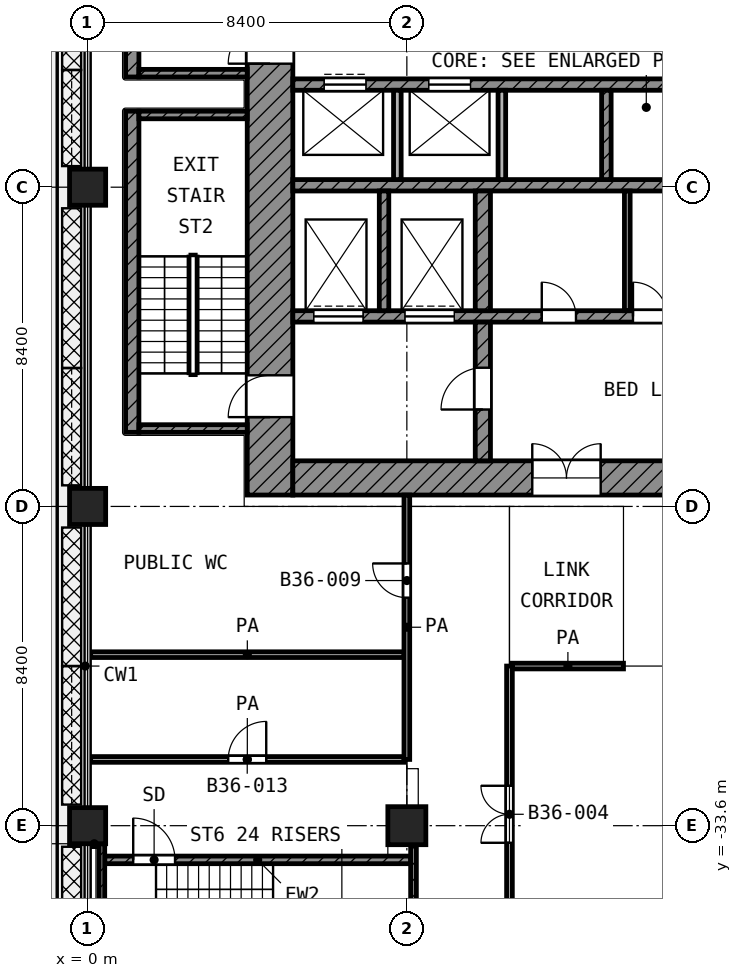
"""IFC4 building model, lengths in metres.
Left out: names, types, materials, properties, quantities, classifications, styles, units other than length and angle.
Written with IfcOpenShell. Run it as: python <this file> out.ifc"""

import sys

from ifc_helpers import new_model, si_unit, direction, frame, frame_2d, origin, origin_2d, place, context, subcontext, project, spatial, rectangle, extrude, element, fill, save


model = new_model("IFC4")
c1 = context("Model", 3, precision=1e-05, world=origin(), true_north=direction((0.0, 1.0)))
c2 = subcontext(c1, "Body", "Model", "MODEL_VIEW")
j1 = project(units=[si_unit("LENGTHUNIT", "METRE"), si_unit("PLANEANGLEUNIT", "RADIAN")], contexts=[c1])
p1 = place(None, origin())
s1 = spatial("IfcSite", under=j1, at=p1, CompositionType="ELEMENT")
p2 = place(p1, origin())
s2 = spatial("IfcBuilding", under=s1, at=p2, CompositionType="ELEMENT")
p3 = place(p2, frame((0.0, 0.0, 158.4)))
s3 = spatial("IfcBuildingStorey", under=s2, at=p3, CompositionType="ELEMENT", Elevation=158.4)
for number, where, z_axis, x_axis in (
    (1, (0.0, -16.8, 0.0), (0.0, 0.0, 1.0), (1.0, 0.0, 0.0)),
    (2, (0.0, -25.2, 0.0), (0.0, 0.0, 1.0), (1.0, 0.0, 0.0)),
    (3, (0.0, -33.6, 0.0), (0.0, 0.0, 1.0), (1.0, 0.0, 0.0)),
):
    element("IfcColumn", number, at=place(p3, frame(where, z_axis=z_axis, x_axis=x_axis)), inside=s3, PredefinedType="COLUMN", context=c2, shape_type="SweptSolid", body=[
        extrude(rectangle(XDim=0.95, YDim=0.95, at=origin_2d()), origin(), (0.0, 0.0, 1.0), 4.2),
    ])
p4 = place(p3, frame((8.4, -33.6, 0.0), z_axis=(0.0, 0.0, 1.0), x_axis=(1.0, 0.0, 0.0)))
e4 = element("IfcColumn", 4, at=p4, inside=s3, PredefinedType="COLUMN", context=c2, shape_type="SweptSolid", body=[
    extrude(rectangle(XDim=1.0, YDim=1.0, at=origin_2d()), origin(), (0.0, 0.0, 1.0), 4.2),
])
p5 = place(p3, frame((4.8, -24.9, 0.0), z_axis=(0.0, 0.0, 1.0), x_axis=(0.0, 1.0, 0.0)))
e5 = element("IfcWall", 5, at=p5, inside=s3, PredefinedType="SHEAR", context=c2, shape_type="SweptSolid", body=[
    extrude(rectangle(XDim=19.5, YDim=1.2, at=frame_2d((9.75, 0.0))), origin(), (0.0, 0.0, 1.0), 3.6),
])
p6 = place(p5, frame((11.35, 0.0, 0.0)))
e6 = element("IfcOpeningElement", 6, at=p6, cuts=e5, PredefinedType="OPENING", context=c2, shape_type="SweptSolid", body=[
    extrude(rectangle(XDim=1.1, YDim=2.1, at=frame_2d((0.55, 1.05))), frame((0.0, 0.61, 0.0), z_axis=(0.0, -1.0, 0.0), x_axis=(1.0, 0.0, 0.0)), (0.0, 0.0, 1.0), 1.22),
])
p7 = place(p5, frame((2.05, 0.0, 0.0)))
e7 = element("IfcOpeningElement", 7, at=p7, cuts=e5, PredefinedType="OPENING", context=c2, shape_type="SweptSolid", body=[
    extrude(rectangle(XDim=1.1, YDim=2.1, at=frame_2d((0.55, 1.05))), frame((0.0, 0.61, 0.0), z_axis=(0.0, -1.0, 0.0), x_axis=(1.0, 0.0, 0.0)), (0.0, 0.0, 1.0), 1.22),
])
p8 = place(p3, frame((5.4, -24.45, 0.0), z_axis=(0.0, 0.0, 1.0), x_axis=(1.0, 0.0, 0.0)))
e8 = element("IfcWall", 8, at=p8, inside=s3, PredefinedType="SHEAR", context=c2, shape_type="SweptSolid", body=[
    extrude(rectangle(XDim=18.6, YDim=0.9, at=frame_2d((9.3, 0.0))), origin(), (0.0, 0.0, 1.0), 3.6),
])
p9 = place(p8, frame((6.3, 0.0, 0.0)))
e9 = element("IfcOpeningElement", 9, at=p9, cuts=e8, PredefinedType="OPENING", context=c2, shape_type="SweptSolid", body=[
    extrude(rectangle(XDim=1.8, YDim=2.1, at=frame_2d((0.9, 1.05))), frame((0.0, 0.46, 0.0), z_axis=(0.0, -1.0, 0.0), x_axis=(1.0, 0.0, 0.0)), (0.0, 0.0, 1.0), 0.92),
])
p10 = place(p3, frame((5.4, -14.1, 0.0), z_axis=(0.0, 0.0, 1.0), x_axis=(1.0, 0.0, 0.0)))
e10 = element("IfcWall", 10, at=p10, inside=s3, PredefinedType="SHEAR", context=c2, shape_type="SweptSolid", body=[
    extrude(rectangle(XDim=16.65, YDim=0.3, at=frame_2d((8.325, 0.0))), origin(), (0.0, 0.0, 1.0), 3.6),
])
p11 = place(p10, frame((0.825, 0.0, 0.0)))
e11 = element("IfcOpeningElement", 11, at=p11, cuts=e10, PredefinedType="OPENING", context=c2, shape_type="SweptSolid", body=[
    extrude(rectangle(XDim=1.1, YDim=2.1, at=frame_2d((0.55, 1.05))), frame((0.0, 0.16, 0.0), z_axis=(0.0, -1.0, 0.0), x_axis=(1.0, 0.0, 0.0)), (0.0, 0.0, 1.0), 0.32),
])
p12 = place(p10, frame((3.575, 0.0, 0.0)))
e12 = element("IfcOpeningElement", 12, at=p12, cuts=e10, PredefinedType="OPENING", context=c2, shape_type="SweptSolid", body=[
    extrude(rectangle(XDim=1.1, YDim=2.1, at=frame_2d((0.55, 1.05))), frame((0.0, 0.16, 0.0), z_axis=(0.0, -1.0, 0.0), x_axis=(1.0, 0.0, 0.0)), (0.0, 0.0, 1.0), 0.32),
])
p13 = place(p3, frame((5.4, -16.75, 0.0), z_axis=(0.0, 0.0, 1.0), x_axis=(1.0, 0.0, 0.0)))
e13 = element("IfcWall", 13, at=p13, inside=s3, PredefinedType="SHEAR", context=c2, shape_type="SweptSolid", body=[
    extrude(rectangle(XDim=16.65, YDim=0.3, at=frame_2d((8.325, 0.0))), origin(), (0.0, 0.0, 1.0), 3.6),
])
p14 = place(p3, frame((5.4, -20.2, 0.0), z_axis=(0.0, 0.0, 1.0), x_axis=(1.0, 0.0, 0.0)))
e14 = element("IfcWall", 14, at=p14, inside=s3, PredefinedType="SHEAR", context=c2, shape_type="SweptSolid", body=[
    extrude(rectangle(XDim=14.65, YDim=0.3, at=frame_2d((7.325, 0.0))), origin(), (0.0, 0.0, 1.0), 3.6),
])
p15 = place(p14, frame((10.55, 0.0, 0.0)))
e15 = element("IfcOpeningElement", 15, at=p15, cuts=e14, PredefinedType="OPENING", context=c2, shape_type="SweptSolid", body=[
    extrude(rectangle(XDim=1.3, YDim=2.1, at=frame_2d((0.65, 1.05))), frame((0.0, 0.16, 0.0), z_axis=(0.0, -1.0, 0.0), x_axis=(1.0, 0.0, 0.0)), (0.0, 0.0, 1.0), 0.32),
])
p16 = place(p14, frame((12.95, 0.0, 0.0)))
e16 = element("IfcOpeningElement", 16, at=p16, cuts=e14, PredefinedType="OPENING", context=c2, shape_type="SweptSolid", body=[
    extrude(rectangle(XDim=1.3, YDim=2.1, at=frame_2d((0.65, 1.05))), frame((0.0, 0.16, 0.0), z_axis=(0.0, -1.0, 0.0), x_axis=(1.0, 0.0, 0.0)), (0.0, 0.0, 1.0), 0.32),
])
p17 = place(p14, frame((0.55, 0.0, 0.0)))
e17 = element("IfcOpeningElement", 17, at=p17, cuts=e14, PredefinedType="OPENING", context=c2, shape_type="SweptSolid", body=[
    extrude(rectangle(XDim=1.3, YDim=2.1, at=frame_2d((0.65, 1.05))), frame((0.0, 0.16, 0.0), z_axis=(0.0, -1.0, 0.0), x_axis=(1.0, 0.0, 0.0)), (0.0, 0.0, 1.0), 0.32),
])
p18 = place(p14, frame((2.95, 0.0, 0.0)))
e18 = element("IfcOpeningElement", 18, at=p18, cuts=e14, PredefinedType="OPENING", context=c2, shape_type="SweptSolid", body=[
    extrude(rectangle(XDim=1.3, YDim=2.1, at=frame_2d((0.65, 1.05))), frame((0.0, 0.16, 0.0), z_axis=(0.0, -1.0, 0.0), x_axis=(1.0, 0.0, 0.0)), (0.0, 0.0, 1.0), 0.32),
])
p19 = place(p14, frame((6.55, 0.0, 0.0)))
e19 = element("IfcOpeningElement", 19, at=p19, cuts=e14, PredefinedType="OPENING", context=c2, shape_type="SweptSolid", body=[
    extrude(rectangle(XDim=0.9, YDim=2.1, at=frame_2d((0.45, 1.05))), frame((0.0, 0.16, 0.0), z_axis=(0.0, -1.0, 0.0), x_axis=(1.0, 0.0, 0.0)), (0.0, 0.0, 1.0), 0.32),
])
p20 = place(p14, frame((8.95, 0.0, 0.0)))
e20 = element("IfcOpeningElement", 20, at=p20, cuts=e14, PredefinedType="OPENING", context=c2, shape_type="SweptSolid", body=[
    extrude(rectangle(XDim=0.9, YDim=2.1, at=frame_2d((0.45, 1.05))), frame((0.0, 0.16, 0.0), z_axis=(0.0, -1.0, 0.0), x_axis=(1.0, 0.0, 0.0)), (0.0, 0.0, 1.0), 0.32),
])
p21 = place(p3, frame((10.4, -24.0, 0.0), z_axis=(0.0, 0.0, 1.0), x_axis=(0.0, 1.0, 0.0)))
e21 = element("IfcWall", 21, at=p21, inside=s3, PredefinedType="SHEAR", context=c2, shape_type="SweptSolid", body=[
    extrude(rectangle(XDim=3.65, YDim=0.4, at=frame_2d((1.825, 0.0))), origin(), (0.0, 0.0, 1.0), 3.6),
])
p22 = place(p21, frame((1.35, 0.0, 0.0)))
e22 = element("IfcOpeningElement", 22, at=p22, cuts=e21, PredefinedType="OPENING", context=c2, shape_type="SweptSolid", body=[
    extrude(rectangle(XDim=1.1, YDim=2.1, at=frame_2d((0.55, 1.05))), frame((0.0, 0.21, 0.0), z_axis=(0.0, -1.0, 0.0), x_axis=(1.0, 0.0, 0.0)), (0.0, 0.0, 1.0), 0.42),
])
p23 = place(p3, frame((10.4, -20.05, 0.0), z_axis=(0.0, 0.0, 1.0), x_axis=(0.0, 1.0, 0.0)))
e23 = element("IfcWall", 23, at=p23, inside=s3, PredefinedType="SHEAR", context=c2, shape_type="SweptSolid", body=[
    extrude(rectangle(XDim=3.15, YDim=0.4, at=frame_2d((1.575, 0.0))), origin(), (0.0, 0.0, 1.0), 3.6),
])
p24 = place(p3, frame((7.8, -20.05, 0.0), z_axis=(0.0, 0.0, 1.0), x_axis=(0.0, 1.0, 0.0)))
e24 = element("IfcWall", 24, at=p24, inside=s3, PredefinedType="SHEAR", context=c2, shape_type="SweptSolid", body=[
    extrude(rectangle(XDim=3.15, YDim=0.25, at=frame_2d((1.575, 0.0))), origin(), (0.0, 0.0, 1.0), 3.6),
])
for number, where, z_axis, x_axis in (
    (25, (8.15, -16.6, 0.0), (0.0, 0.0, 1.0), (0.0, 1.0, 0.0)),
    (26, (10.9, -16.6, 0.0), (0.0, 0.0, 1.0), (0.0, 1.0, 0.0)),
):
    element("IfcWall", number, at=place(p3, frame(where, z_axis=z_axis, x_axis=x_axis)), inside=s3, PredefinedType="PARTITIONING", context=c2, shape_type="SweptSolid", body=[
        extrude(rectangle(XDim=2.35, YDim=0.2, at=frame_2d((1.175, 0.0))), origin(), (0.0, 0.0, 1.0), 3.6),
    ])
p25 = place(p3, frame((13.65, -16.6, 0.0), z_axis=(0.0, 0.0, 1.0), x_axis=(0.0, 1.0, 0.0)))
e27 = element("IfcWall", 27, at=p25, inside=s3, PredefinedType="SHEAR", context=c2, shape_type="SweptSolid", body=[
    extrude(rectangle(XDim=2.35, YDim=0.25, at=frame_2d((1.175, 0.0))), origin(), (0.0, 0.0, 1.0), 3.6),
])
p26 = place(p3, frame((14.2, -20.05, 0.0), z_axis=(0.0, 0.0, 1.0), x_axis=(0.0, 1.0, 0.0)))
e28 = element("IfcWall", 28, at=p26, inside=s3, PredefinedType="PARTITIONING", context=c2, shape_type="SweptSolid", body=[
    extrude(rectangle(XDim=3.15, YDim=0.15, at=frame_2d((1.575, 0.0))), origin(), (0.0, 0.0, 1.0), 3.6),
])
p27 = place(p3, frame((1.175, -13.9, 0.0), z_axis=(0.0, 0.0, 1.0), x_axis=(0.0, 1.0, 0.0)))
e29 = element("IfcWall", 29, at=p27, inside=s3, PredefinedType="SHEAR", context=c2, shape_type="SweptSolid", body=[
    extrude(rectangle(XDim=8.45, YDim=0.35, at=frame_2d((4.225, 0.0))), origin(), (0.0, 0.0, 1.0), 3.6),
])
p28 = place(p3, frame((1.35, -13.8, 0.0), z_axis=(0.0, 0.0, 1.0), x_axis=(1.0, 0.0, 0.0)))
e30 = element("IfcWall", 30, at=p28, inside=s3, PredefinedType="SHEAR", context=c2, shape_type="SweptSolid", body=[
    extrude(rectangle(XDim=2.85, YDim=0.2, at=frame_2d((1.425, 0.0))), origin(), (0.0, 0.0, 1.0), 3.6),
])
p29 = place(p3, frame((1.175, -23.25, 0.0), z_axis=(0.0, 0.0, 1.0), x_axis=(0.0, 1.0, 0.0)))
e31 = element("IfcWall", 31, at=p29, inside=s3, PredefinedType="SHEAR", context=c2, shape_type="SweptSolid", body=[
    extrude(rectangle(XDim=8.45, YDim=0.35, at=frame_2d((4.225, 0.0))), origin(), (0.0, 0.0, 1.0), 3.6),
])
for number, where, z_axis, x_axis in (
    (32, (1.35, -14.9, 0.0), (0.0, 0.0, 1.0), (1.0, 0.0, 0.0)),
    (33, (1.35, -23.15, 0.0), (0.0, 0.0, 1.0), (1.0, 0.0, 0.0)),
):
    element("IfcWall", number, at=place(p3, frame(where, z_axis=z_axis, x_axis=x_axis)), inside=s3, PredefinedType="SHEAR", context=c2, shape_type="SweptSolid", body=[
        extrude(rectangle(XDim=2.85, YDim=0.2, at=frame_2d((1.425, 0.0))), origin(), (0.0, 0.0, 1.0), 3.6),
    ])
p30 = place(p3, frame((0.375, -40.05, 0.0), z_axis=(0.0, 0.0, 1.0), x_axis=(0.0, 1.0, 0.0)))
e34 = element("IfcWall", 34, at=p30, inside=s3, PredefinedType="SHEAR", context=c2, shape_type="SweptSolid", body=[
    extrude(rectangle(XDim=5.975, YDim=0.15, at=frame_2d((2.988, 0.0))), origin(), (0.0, 0.0, 1.0), 3.6),
])
p31 = place(p3, frame((8.575, -40.05, 0.0), z_axis=(0.0, 0.0, 1.0), x_axis=(0.0, 1.0, 0.0)))
e35 = element("IfcWall", 35, at=p31, inside=s3, PredefinedType="SHEAR", context=c2, shape_type="SweptSolid", body=[
    extrude(rectangle(XDim=5.95, YDim=0.15, at=frame_2d((2.975, 0.0))), origin(), (0.0, 0.0, 1.0), 3.6),
])
p32 = place(p3, frame((0.45, -34.5, 0.0), z_axis=(0.0, 0.0, 1.0), x_axis=(1.0, 0.0, 0.0)))
e36 = element("IfcWall", 36, at=p32, inside=s3, PredefinedType="SHEAR", context=c2, shape_type="SweptSolid", body=[
    extrude(rectangle(XDim=8.05, YDim=0.2, at=frame_2d((4.025, 0.0))), origin(), (0.0, 0.0, 1.0), 3.6),
])
p33 = place(p32, frame((0.75, 0.0, 0.0)))
e37 = element("IfcOpeningElement", 37, at=p33, cuts=e36, PredefinedType="OPENING", context=c2, shape_type="SweptSolid", body=[
    extrude(rectangle(XDim=1.1, YDim=2.1, at=frame_2d((0.55, 1.05))), frame((0.0, 0.11, 0.0), z_axis=(0.0, -1.0, 0.0), x_axis=(1.0, 0.0, 0.0)), (0.0, 0.0, 1.0), 0.22),
])
p34 = place(p3, frame((0.08, -34.075, 0.0), z_axis=(0.0, 0.0, 1.0), x_axis=(1.0, 0.0, 0.0)))
e38 = element("IfcWall", 38, at=p34, inside=s3, PredefinedType="PARTITIONING", context=c2, shape_type="SweptSolid", body=[
    extrude(rectangle(XDim=0.19, YDim=0.15, at=frame_2d((0.095, 0.0))), origin(), (0.0, 0.0, 1.0), 3.6),
])
p35 = place(p3, frame((0.08, -31.857, 0.0), z_axis=(0.0, 0.0, 1.0), x_axis=(1.0, 0.0, 0.0)))
e39 = element("IfcWall", 39, at=p35, inside=s3, PredefinedType="PARTITIONING", context=c2, shape_type="SweptSolid", body=[
    extrude(rectangle(XDim=8.245, YDim=0.15, at=frame_2d((4.123, 0.0))), origin(), (0.0, 0.0, 1.0), 3.6),
])
p36 = place(p35, frame((3.62, 0.0, 0.0)))
e40 = element("IfcOpeningElement", 40, at=p36, cuts=e39, PredefinedType="OPENING", context=c2, shape_type="SweptSolid", body=[
    extrude(rectangle(XDim=1.0, YDim=2.1, at=frame_2d((0.5, 1.05))), frame((0.0, 0.085, 0.0), z_axis=(0.0, -1.0, 0.0), x_axis=(1.0, 0.0, 0.0)), (0.0, 0.0, 1.0), 0.17),
])
p37 = place(p3, frame((11.175, -29.4, 0.0), z_axis=(0.0, 0.0, 1.0), x_axis=(1.0, 0.0, 0.0)))
e41 = element("IfcWall", 41, at=p37, inside=s3, PredefinedType="PARTITIONING", context=c2, shape_type="SweptSolid", body=[
    extrude(rectangle(XDim=2.925, YDim=0.15, at=frame_2d((1.462, 0.0))), origin(), (0.0, 0.0, 1.0), 3.6),
])
p38 = place(p3, frame((0.08, -29.1, 0.0), z_axis=(0.0, 0.0, 1.0), x_axis=(1.0, 0.0, 0.0)))
e42 = element("IfcWall", 42, at=p38, inside=s3, PredefinedType="PARTITIONING", context=c2, shape_type="SweptSolid", body=[
    extrude(rectangle(XDim=8.245, YDim=0.15, at=frame_2d((4.123, 0.0))), origin(), (0.0, 0.0, 1.0), 3.6),
])
p39 = place(p3, frame((8.4, -31.857, 0.0), z_axis=(0.0, 0.0, 1.0), x_axis=(0.0, 1.0, 0.0)))
e43 = element("IfcWall", 43, at=p39, inside=s3, PredefinedType="PARTITIONING", context=c2, shape_type="SweptSolid", body=[
    extrude(rectangle(XDim=6.957, YDim=0.15, at=frame_2d((3.479, 0.0))), origin(), (0.0, 0.0, 1.0), 3.6),
])
p40 = place(p39, frame((4.257, 0.0, 0.0)))
e44 = element("IfcOpeningElement", 44, at=p40, cuts=e43, PredefinedType="OPENING", context=c2, shape_type="SweptSolid", body=[
    extrude(rectangle(XDim=0.9, YDim=2.1, at=frame_2d((0.45, 1.05))), frame((0.0, 0.085, 0.0), z_axis=(0.0, -1.0, 0.0), x_axis=(1.0, 0.0, 0.0)), (0.0, 0.0, 1.0), 0.17),
])
p41 = place(p3, frame((11.1, -58.72, 0.0), z_axis=(0.0, 0.0, 1.0), x_axis=(0.0, 1.0, 0.0)))
e45 = element("IfcWall", 45, at=p41, inside=s3, PredefinedType="PARTITIONING", context=c2, shape_type="SweptSolid", body=[
    extrude(rectangle(XDim=29.32, YDim=0.15, at=frame_2d((14.66, 0.0))), origin(), (0.0, 0.0, 1.0), 3.6),
])
p42 = place(p41, frame((24.67, 0.0, 0.0)))
e46 = element("IfcOpeningElement", 46, at=p42, cuts=e45, PredefinedType="OPENING", context=c2, shape_type="SweptSolid", body=[
    extrude(rectangle(XDim=1.5, YDim=2.1, at=frame_2d((0.75, 1.05))), frame((0.0, 0.085, 0.0), z_axis=(0.0, -1.0, 0.0), x_axis=(1.0, 0.0, 0.0)), (0.0, 0.0, 1.0), 0.17),
])
p43 = place(p41, frame((16.27, 0.0, 0.0)))
e47 = element("IfcOpeningElement", 47, at=p43, cuts=e45, PredefinedType="OPENING", context=c2, shape_type="SweptSolid", body=[
    extrude(rectangle(XDim=1.5, YDim=2.1, at=frame_2d((0.75, 1.05))), frame((0.0, 0.085, 0.0), z_axis=(0.0, -1.0, 0.0), x_axis=(1.0, 0.0, 0.0)), (0.0, 0.0, 1.0), 0.17),
])
p44 = place(p41, frame((7.27, 0.0, 0.0)))
e48 = element("IfcOpeningElement", 48, at=p44, cuts=e45, PredefinedType="OPENING", context=c2, shape_type="SweptSolid", body=[
    extrude(rectangle(XDim=1.5, YDim=2.1, at=frame_2d((0.75, 1.05))), frame((0.0, 0.085, 0.0), z_axis=(0.0, -1.0, 0.0), x_axis=(1.0, 0.0, 0.0)), (0.0, 0.0, 1.0), 0.17),
])
p45 = place(p41, frame((1.22, 0.0, 0.0)))
e49 = element("IfcOpeningElement", 49, at=p45, cuts=e45, PredefinedType="OPENING", context=c2, shape_type="SweptSolid", body=[
    extrude(rectangle(XDim=1.0, YDim=2.1, at=frame_2d((0.5, 1.05))), frame((0.0, 0.085, 0.0), z_axis=(0.0, -1.0, 0.0), x_axis=(1.0, 0.0, 0.0)), (0.0, 0.0, 1.0), 0.17),
])
p46 = place(p11, origin())
e50 = element("IfcDoor", 50, at=p46, inside=s3, OperationType="DOUBLE_DOOR_SLIDING", PredefinedType="DOOR", context=c2, shape_type="SweptSolid", body=[
    extrude(rectangle(XDim=1.1, YDim=2.1, at=frame_2d((0.55, 1.05))), frame((0.0, 0.025, 0.0), z_axis=(0.0, -1.0, 0.0), x_axis=(1.0, 0.0, 0.0)), (0.0, 0.0, 1.0), 0.05),
])
fill(e11, e50)
p47 = place(p12, origin())
e51 = element("IfcDoor", 51, at=p47, inside=s3, OperationType="DOUBLE_DOOR_SLIDING", PredefinedType="DOOR", context=c2, shape_type="SweptSolid", body=[
    extrude(rectangle(XDim=1.1, YDim=2.1, at=frame_2d((0.55, 1.05))), frame((0.0, 0.025, 0.0), z_axis=(0.0, -1.0, 0.0), x_axis=(1.0, 0.0, 0.0)), (0.0, 0.0, 1.0), 0.05),
])
fill(e12, e51)
p48 = place(p17, origin())
e52 = element("IfcDoor", 52, at=p48, inside=s3, OperationType="DOUBLE_DOOR_SLIDING", PredefinedType="DOOR", context=c2, shape_type="SweptSolid", body=[
    extrude(rectangle(XDim=1.3, YDim=2.1, at=frame_2d((0.65, 1.05))), frame((0.0, 0.025, 0.0), z_axis=(0.0, -1.0, 0.0), x_axis=(1.0, 0.0, 0.0)), (0.0, 0.0, 1.0), 0.05),
])
fill(e17, e52)
p49 = place(p18, origin())
e53 = element("IfcDoor", 53, at=p49, inside=s3, OperationType="DOUBLE_DOOR_SLIDING", PredefinedType="DOOR", context=c2, shape_type="SweptSolid", body=[
    extrude(rectangle(XDim=1.3, YDim=2.1, at=frame_2d((0.65, 1.05))), frame((0.0, 0.025, 0.0), z_axis=(0.0, -1.0, 0.0), x_axis=(1.0, 0.0, 0.0)), (0.0, 0.0, 1.0), 0.05),
])
fill(e18, e53)
p50 = place(p6, origin())
e54 = element("IfcDoor", 54, at=p50, inside=s3, OperationType="SINGLE_SWING_LEFT", PredefinedType="DOOR", context=c2, shape_type="SweptSolid", body=[
    extrude(rectangle(XDim=1.1, YDim=2.1, at=frame_2d((0.55, 1.05))), frame((0.0, 0.025, 0.0), z_axis=(0.0, -1.0, 0.0), x_axis=(1.0, 0.0, 0.0)), (0.0, 0.0, 1.0), 0.05),
])
fill(e6, e54)
p51 = place(p7, origin())
e55 = element("IfcDoor", 55, at=p51, inside=s3, OperationType="SINGLE_SWING_LEFT", PredefinedType="DOOR", context=c2, shape_type="SweptSolid", body=[
    extrude(rectangle(XDim=1.1, YDim=2.1, at=frame_2d((0.55, 1.05))), frame((0.0, 0.025, 0.0), z_axis=(0.0, -1.0, 0.0), x_axis=(1.0, 0.0, 0.0)), (0.0, 0.0, 1.0), 0.05),
])
fill(e7, e55)
p52 = place(p22, origin())
e56 = element("IfcDoor", 56, at=p52, inside=s3, OperationType="SINGLE_SWING_LEFT", PredefinedType="DOOR", context=c2, shape_type="SweptSolid", body=[
    extrude(rectangle(XDim=1.1, YDim=2.1, at=frame_2d((0.55, 1.05))), frame((0.0, 0.025, 0.0), z_axis=(0.0, -1.0, 0.0), x_axis=(1.0, 0.0, 0.0)), (0.0, 0.0, 1.0), 0.05),
])
fill(e22, e56)
p53 = place(p9, origin())
e57 = element("IfcDoor", 57, at=p53, inside=s3, OperationType="DOUBLE_DOOR_SINGLE_SWING", PredefinedType="DOOR", context=c2, shape_type="SweptSolid", body=[
    extrude(rectangle(XDim=1.8, YDim=2.1, at=frame_2d((0.9, 1.05))), frame((0.0, 0.025, 0.0), z_axis=(0.0, -1.0, 0.0), x_axis=(1.0, 0.0, 0.0)), (0.0, 0.0, 1.0), 0.05),
])
fill(e9, e57)
p54 = place(p19, origin())
e58 = element("IfcDoor", 58, at=p54, inside=s3, OperationType="SINGLE_SWING_LEFT", PredefinedType="DOOR", context=c2, shape_type="SweptSolid", body=[
    extrude(rectangle(XDim=0.9, YDim=2.1, at=frame_2d((0.45, 1.05))), frame((0.0, 0.025, 0.0), z_axis=(0.0, -1.0, 0.0), x_axis=(1.0, 0.0, 0.0)), (0.0, 0.0, 1.0), 0.05),
])
fill(e19, e58)
p55 = place(p20, origin())
e59 = element("IfcDoor", 59, at=p55, inside=s3, OperationType="SINGLE_SWING_LEFT", PredefinedType="DOOR", context=c2, shape_type="SweptSolid", body=[
    extrude(rectangle(XDim=0.9, YDim=2.1, at=frame_2d((0.45, 1.05))), frame((0.0, 0.025, 0.0), z_axis=(0.0, -1.0, 0.0), x_axis=(1.0, 0.0, 0.0)), (0.0, 0.0, 1.0), 0.05),
])
fill(e20, e59)
p56 = place(p33, origin())
e60 = element("IfcDoor", 60, at=p56, inside=s3, OperationType="SINGLE_SWING_LEFT", PredefinedType="DOOR", context=c2, shape_type="SweptSolid", body=[
    extrude(rectangle(XDim=1.1, YDim=2.1, at=frame_2d((0.55, 1.05))), frame((0.0, 0.025, 0.0), z_axis=(0.0, -1.0, 0.0), x_axis=(1.0, 0.0, 0.0)), (0.0, 0.0, 1.0), 0.05),
])
fill(e37, e60)
p57 = place(p40, origin())
e61 = element("IfcDoor", 61, at=p57, inside=s3, OperationType="SINGLE_SWING_RIGHT", PredefinedType="DOOR", context=c2, shape_type="SweptSolid", body=[
    extrude(rectangle(XDim=0.9, YDim=2.1, at=frame_2d((0.45, 1.05))), frame((0.0, 0.025, 0.0), z_axis=(0.0, -1.0, 0.0), x_axis=(1.0, 0.0, 0.0)), (0.0, 0.0, 1.0), 0.05),
])
fill(e44, e61)
p58 = place(p36, origin())
e62 = element("IfcDoor", 62, at=p58, inside=s3, OperationType="SINGLE_SWING_RIGHT", PredefinedType="DOOR", context=c2, shape_type="SweptSolid", body=[
    extrude(rectangle(XDim=1.0, YDim=2.1, at=frame_2d((0.5, 1.05))), frame((0.0, 0.025, 0.0), z_axis=(0.0, -1.0, 0.0), x_axis=(1.0, 0.0, 0.0)), (0.0, 0.0, 1.0), 0.05),
])
fill(e40, e62)
p59 = place(p42, origin())
e63 = element("IfcDoor", 63, at=p59, inside=s3, OperationType="DOUBLE_DOOR_SINGLE_SWING", PredefinedType="DOOR", context=c2, shape_type="SweptSolid", body=[
    extrude(rectangle(XDim=1.5, YDim=2.1, at=frame_2d((0.75, 1.05))), frame((0.0, 0.025, 0.0), z_axis=(0.0, -1.0, 0.0), x_axis=(1.0, 0.0, 0.0)), (0.0, 0.0, 1.0), 0.05),
])
fill(e46, e63)
save(model, sys.argv[1])
